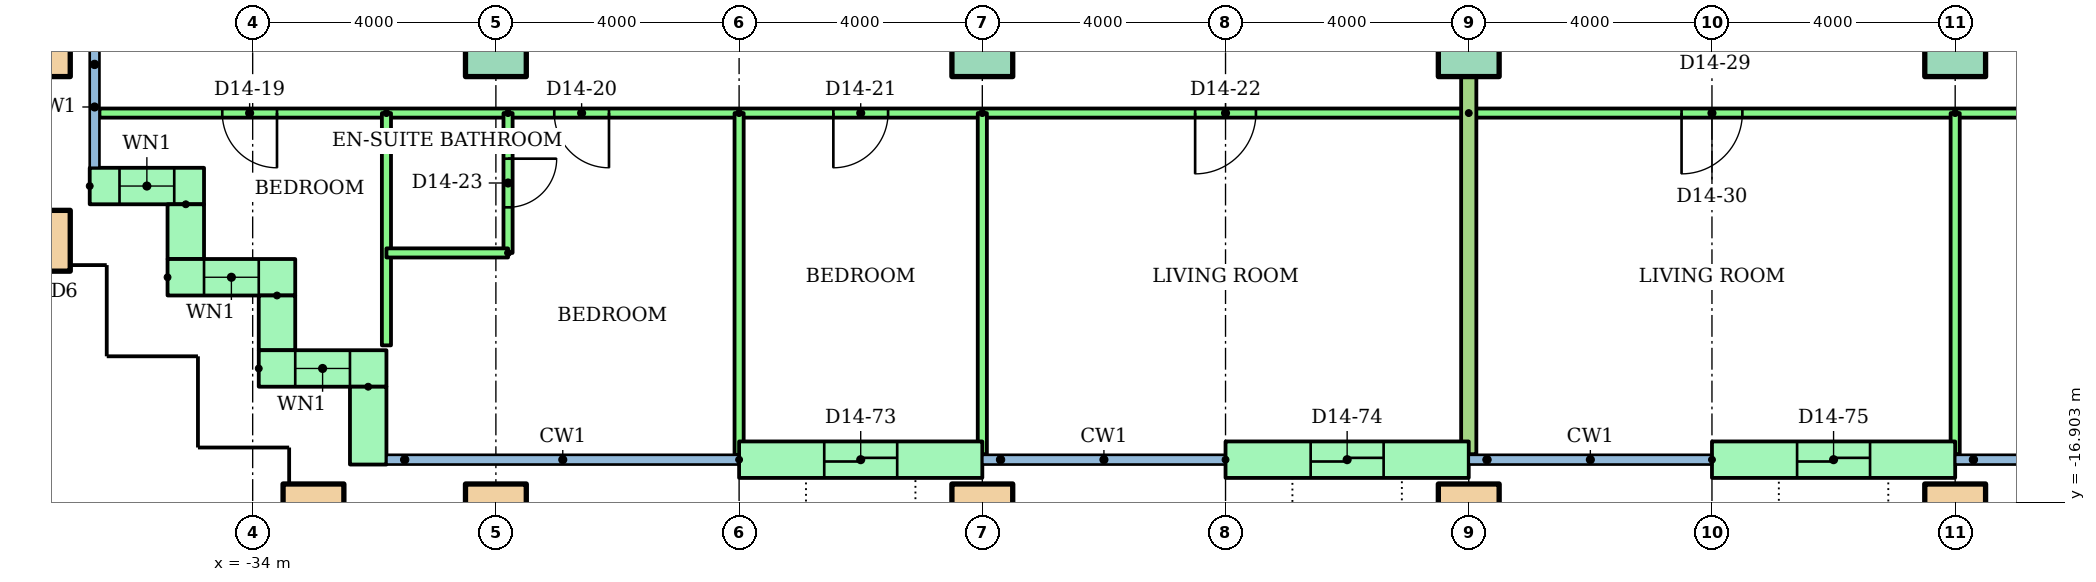
"""IFC4 building model, lengths in metres.
Left out: names, types, materials, properties, quantities, classifications, styles, units other than length and angle.
Written with IfcOpenShell. Run it as: python <this file> out.ifc"""

import sys

from ifc_helpers import new_model, si_unit, direction, frame, frame_2d, origin, origin_2d, place, context, subcontext, project, spatial, rectangle, hollow_rectangle, extrude, element, fill, save


model = new_model("IFC4")
c1 = context("Model", 3, precision=1e-05, world=origin(), true_north=direction((0.0, 1.0)))
c2 = subcontext(c1, "Body", "Model", "MODEL_VIEW")
j1 = project(units=[si_unit("LENGTHUNIT", "METRE"), si_unit("PLANEANGLEUNIT", "RADIAN")], contexts=[c1])
p1 = place(None, origin())
s1 = spatial("IfcSite", under=j1, at=p1, CompositionType="ELEMENT")
p2 = place(p1, origin())
s2 = spatial("IfcBuilding", under=s1, at=p2, CompositionType="ELEMENT")
p3 = place(p2, frame((0.0, 0.0, 54.4)))
s3 = spatial("IfcBuildingStorey", under=s2, at=p3, CompositionType="ELEMENT", Elevation=54.4)
for number, where in (
    (1, (-33.0, -17.1, 0.0)),
    (2, (-30.0, -17.1, 0.0)),
    (3, (-22.0, -17.1, 0.0)),
    (4, (-14.0, -17.1, 0.0)),
    (5, (-6.0, -17.1, 0.0)),
    (6, (-37.5, -12.6, 0.0)),
    (7, (-37.5, -9.4, 0.0)),
):
    element("IfcColumn", number, at=place(p3, frame(where)), inside=s3, PredefinedType="COLUMN", context=c2, shape_type="SweptSolid", body=[
        extrude(hollow_rectangle(XDim=1.0, YDim=1.0, WallThickness=0.05, at=origin_2d()), origin(), (0.0, 0.0, 1.0), 3.2),
    ])
for number, where in (
    (8, (-30.0, -9.4, 0.0)),
    (9, (-22.0, -9.4, 0.0)),
    (10, (-14.0, -9.4, 0.0)),
    (11, (-6.0, -9.4, 0.0)),
):
    element("IfcColumn", number, at=place(p3, frame(where)), inside=s3, PredefinedType="COLUMN", context=c2, shape_type="SweptSolid", body=[
        extrude(rectangle(XDim=1.0, YDim=1.0, at=origin_2d()), origin(), (0.0, 0.0, 1.0), 3.2),
    ])
p4 = place(p3, frame((-36.68, -11.7, 0.0)))
e12 = element("IfcWall", 12, at=p4, inside=s3, PredefinedType="STANDARD", context=c2, shape_type="SweptSolid", body=[
    extrude(rectangle(XDim=1.88, YDim=0.6, at=frame_2d((0.94, 0.0))), origin(), (0.0, 0.0, 1.0), 2.92),
])
p5 = place(p4, frame((0.49, 0.0, 0.9)))
e13 = element("IfcOpeningElement", 13, at=p5, cuts=e12, PredefinedType="OPENING", context=c2, shape_type="SweptSolid", body=[
    extrude(rectangle(XDim=0.9, YDim=1.5, at=frame_2d((0.45, 0.75))), frame((0.0, 0.31, 0.0), z_axis=(0.0, -1.0, 0.0), x_axis=(1.0, 0.0, 0.0)), (0.0, 0.0, 1.0), 0.62),
])
p6 = place(p3, frame((-35.1, -12.0, 0.0), z_axis=(0.0, 0.0, 1.0), x_axis=(0.0, -1.0, 0.0)))
e14 = element("IfcWall", 14, at=p6, inside=s3, PredefinedType="STANDARD", context=c2, shape_type="SweptSolid", body=[
    extrude(rectangle(XDim=0.9, YDim=0.6, at=frame_2d((0.45, 0.0))), origin(), (0.0, 0.0, 1.0), 2.92),
])
p7 = place(p3, frame((-35.4, -13.2, 0.0)))
e15 = element("IfcWall", 15, at=p7, inside=s3, PredefinedType="STANDARD", context=c2, shape_type="SweptSolid", body=[
    extrude(rectangle(XDim=2.1, YDim=0.6, at=frame_2d((1.05, 0.0))), origin(), (0.0, 0.0, 1.0), 2.92),
])
p8 = place(p7, frame((0.6, 0.0, 0.9)))
e16 = element("IfcOpeningElement", 16, at=p8, cuts=e15, PredefinedType="OPENING", context=c2, shape_type="SweptSolid", body=[
    extrude(rectangle(XDim=0.9, YDim=1.5, at=frame_2d((0.45, 0.75))), frame((0.0, 0.31, 0.0), z_axis=(0.0, -1.0, 0.0), x_axis=(1.0, 0.0, 0.0)), (0.0, 0.0, 1.0), 0.62),
])
p9 = place(p3, frame((-33.6, -13.5, 0.0), z_axis=(0.0, 0.0, 1.0), x_axis=(0.0, -1.0, 0.0)))
e17 = element("IfcWall", 17, at=p9, inside=s3, PredefinedType="STANDARD", context=c2, shape_type="SweptSolid", body=[
    extrude(rectangle(XDim=0.9, YDim=0.6, at=frame_2d((0.45, 0.0))), origin(), (0.0, 0.0, 1.0), 2.92),
])
p10 = place(p3, frame((-33.9, -14.7, 0.0)))
e18 = element("IfcWall", 18, at=p10, inside=s3, PredefinedType="STANDARD", context=c2, shape_type="SweptSolid", body=[
    extrude(rectangle(XDim=2.1, YDim=0.6, at=frame_2d((1.05, 0.0))), origin(), (0.0, 0.0, 1.0), 2.92),
])
p11 = place(p10, frame((0.6, 0.0, 0.9)))
e19 = element("IfcOpeningElement", 19, at=p11, cuts=e18, PredefinedType="OPENING", context=c2, shape_type="SweptSolid", body=[
    extrude(rectangle(XDim=0.9, YDim=1.5, at=frame_2d((0.45, 0.75))), frame((0.0, 0.31, 0.0), z_axis=(0.0, -1.0, 0.0), x_axis=(1.0, 0.0, 0.0)), (0.0, 0.0, 1.0), 0.62),
])
p12 = place(p3, frame((-32.1, -15.0, 0.0), z_axis=(0.0, 0.0, 1.0), x_axis=(0.0, -1.0, 0.0)))
e20 = element("IfcWall", 20, at=p12, inside=s3, PredefinedType="STANDARD", context=c2, shape_type="SweptSolid", body=[
    extrude(rectangle(XDim=1.28, YDim=0.6, at=frame_2d((0.64, 0.0))), origin(), (0.0, 0.0, 1.0), 2.92),
])
p13 = place(p3, frame((-26.0, -16.2, 0.0)))
e21 = element("IfcWall", 21, at=p13, inside=s3, PredefinedType="STANDARD", context=c2, shape_type="SweptSolid", body=[
    extrude(rectangle(XDim=4.0, YDim=0.6, at=frame_2d((2.0, 0.0))), origin(), (0.0, 0.0, 1.0), 2.92),
])
p14 = place(p13, frame((1.4, 0.0, 0.0)))
e22 = element("IfcOpeningElement", 22, at=p14, cuts=e21, PredefinedType="OPENING", context=c2, shape_type="SweptSolid", body=[
    extrude(rectangle(XDim=1.2, YDim=2.1, at=frame_2d((0.6, 1.05))), frame((0.0, 0.31, 0.0), z_axis=(0.0, -1.0, 0.0), x_axis=(1.0, 0.0, 0.0)), (0.0, 0.0, 1.0), 0.62),
])
p15 = place(p3, frame((-18.0, -16.2, 0.0)))
e23 = element("IfcWall", 23, at=p15, inside=s3, PredefinedType="STANDARD", context=c2, shape_type="SweptSolid", body=[
    extrude(rectangle(XDim=4.0, YDim=0.6, at=frame_2d((2.0, 0.0))), origin(), (0.0, 0.0, 1.0), 2.92),
])
p16 = place(p15, frame((1.4, 0.0, 0.0)))
e24 = element("IfcOpeningElement", 24, at=p16, cuts=e23, PredefinedType="OPENING", context=c2, shape_type="SweptSolid", body=[
    extrude(rectangle(XDim=1.2, YDim=2.1, at=frame_2d((0.6, 1.05))), frame((0.0, 0.31, 0.0), z_axis=(0.0, -1.0, 0.0), x_axis=(1.0, 0.0, 0.0)), (0.0, 0.0, 1.0), 0.62),
])
p17 = place(p3, frame((-10.0, -16.2, 0.0)))
e25 = element("IfcWall", 25, at=p17, inside=s3, PredefinedType="STANDARD", context=c2, shape_type="SweptSolid", body=[
    extrude(rectangle(XDim=4.0, YDim=0.6, at=frame_2d((2.0, 0.0))), origin(), (0.0, 0.0, 1.0), 2.92),
])
p18 = place(p17, frame((1.4, 0.0, 0.0)))
e26 = element("IfcOpeningElement", 26, at=p18, cuts=e25, PredefinedType="OPENING", context=c2, shape_type="SweptSolid", body=[
    extrude(rectangle(XDim=1.2, YDim=2.1, at=frame_2d((0.6, 1.05))), frame((0.0, 0.31, 0.0), z_axis=(0.0, -1.0, 0.0), x_axis=(1.0, 0.0, 0.0)), (0.0, 0.0, 1.0), 0.62),
])
p19 = place(p3, frame((-14.0, -10.5, 0.0), z_axis=(0.0, 0.0, 1.0), x_axis=(-1.0, 0.0, 0.0)))
e27 = element("IfcWall", 27, at=p19, inside=s3, PredefinedType="PARTITIONING", context=c2, shape_type="SweptSolid", body=[
    extrude(rectangle(XDim=22.52, YDim=0.15, at=frame_2d((11.26, 0.0))), origin(), (0.0, 0.0, 1.0), 2.4),
])
p20 = place(p19, frame((19.6, 0.0, 0.0)))
e28 = element("IfcOpeningElement", 28, at=p20, cuts=e27, PredefinedType="OPENING", context=c2, shape_type="SweptSolid", body=[
    extrude(rectangle(XDim=0.9, YDim=2.1, at=frame_2d((0.45, 1.05))), frame((0.0, 0.085, 0.0), z_axis=(0.0, -1.0, 0.0), x_axis=(1.0, 0.0, 0.0)), (0.0, 0.0, 1.0), 0.17),
])
p21 = place(p19, frame((14.14, 0.0, 0.0)))
e29 = element("IfcOpeningElement", 29, at=p21, cuts=e27, PredefinedType="OPENING", context=c2, shape_type="SweptSolid", body=[
    extrude(rectangle(XDim=0.9, YDim=2.1, at=frame_2d((0.45, 1.05))), frame((0.0, 0.085, 0.0), z_axis=(0.0, -1.0, 0.0), x_axis=(1.0, 0.0, 0.0)), (0.0, 0.0, 1.0), 0.17),
])
p22 = place(p19, frame((9.55, 0.0, 0.0)))
e30 = element("IfcOpeningElement", 30, at=p22, cuts=e27, PredefinedType="OPENING", context=c2, shape_type="SweptSolid", body=[
    extrude(rectangle(XDim=0.9, YDim=2.1, at=frame_2d((0.45, 1.05))), frame((0.0, 0.085, 0.0), z_axis=(0.0, -1.0, 0.0), x_axis=(1.0, 0.0, 0.0)), (0.0, 0.0, 1.0), 0.17),
])
p23 = place(p19, frame((3.5, 0.0, 0.0)))
e31 = element("IfcOpeningElement", 31, at=p23, cuts=e27, PredefinedType="OPENING", context=c2, shape_type="SweptSolid", body=[
    extrude(rectangle(XDim=1.0, YDim=2.1, at=frame_2d((0.5, 1.05))), frame((0.0, 0.085, 0.0), z_axis=(0.0, -1.0, 0.0), x_axis=(1.0, 0.0, 0.0)), (0.0, 0.0, 1.0), 0.17),
])
p24 = place(p3, frame((-31.8, -10.5, 0.0), z_axis=(0.0, 0.0, 1.0), x_axis=(0.0, -1.0, 0.0)))
e32 = element("IfcWall", 32, at=p24, inside=s3, PredefinedType="PARTITIONING", context=c2, shape_type="SweptSolid", body=[
    extrude(rectangle(XDim=3.82, YDim=0.15, at=frame_2d((1.91, 0.0))), origin(), (0.0, 0.0, 1.0), 2.4),
])
p25 = place(p3, frame((-26.0, -10.5, 0.0), z_axis=(0.0, 0.0, 1.0), x_axis=(0.0, -1.0, 0.0)))
e33 = element("IfcWall", 33, at=p25, inside=s3, PredefinedType="PARTITIONING", context=c2, shape_type="SweptSolid", body=[
    extrude(rectangle(XDim=5.621, YDim=0.15, at=frame_2d((2.811, 0.0))), origin(), (0.0, 0.0, 1.0), 2.4),
])
p26 = place(p3, frame((-22.0, -10.5, 0.0), z_axis=(0.0, 0.0, 1.0), x_axis=(0.0, -1.0, 0.0)))
e34 = element("IfcWall", 34, at=p26, inside=s3, PredefinedType="PARTITIONING", context=c2, shape_type="SweptSolid", body=[
    extrude(rectangle(XDim=5.61, YDim=0.15, at=frame_2d((2.805, 0.0))), origin(), (0.0, 0.0, 1.0), 2.4),
])
p27 = place(p3, frame((-29.8, -10.5, 0.0), z_axis=(0.0, 0.0, 1.0), x_axis=(0.0, -1.0, 0.0)))
e35 = element("IfcWall", 35, at=p27, inside=s3, PredefinedType="PARTITIONING", context=c2, shape_type="SweptSolid", body=[
    extrude(rectangle(XDim=2.3, YDim=0.15, at=frame_2d((1.15, 0.0))), origin(), (0.0, 0.0, 1.0), 2.4),
])
p28 = place(p27, frame((0.75, 0.0, 0.0)))
e36 = element("IfcOpeningElement", 36, at=p28, cuts=e35, PredefinedType="OPENING", context=c2, shape_type="SweptSolid", body=[
    extrude(rectangle(XDim=0.8, YDim=2.1, at=frame_2d((0.4, 1.05))), frame((0.0, 0.085, 0.0), z_axis=(0.0, -1.0, 0.0), x_axis=(1.0, 0.0, 0.0)), (0.0, 0.0, 1.0), 0.17),
])
p29 = place(p3, frame((-29.8, -12.8, 0.0), z_axis=(0.0, 0.0, 1.0), x_axis=(-1.0, 0.0, 0.0)))
e37 = element("IfcWall", 37, at=p29, inside=s3, PredefinedType="PARTITIONING", context=c2, shape_type="SweptSolid", body=[
    extrude(rectangle(XDim=2.0, YDim=0.15, at=frame_2d((1.0, 0.0))), origin(), (0.0, 0.0, 1.0), 2.4),
])
p30 = place(p3, frame((10.0, -10.5, 0.0), z_axis=(0.0, 0.0, 1.0), x_axis=(-1.0, 0.0, 0.0)))
e38 = element("IfcWall", 38, at=p30, inside=s3, PredefinedType="PARTITIONING", context=c2, shape_type="SweptSolid", body=[
    extrude(rectangle(XDim=24.0, YDim=0.15, at=frame_2d((12.0, 0.0))), origin(), (0.0, 0.0, 1.0), 2.4),
])
p31 = place(p30, frame((19.5, 0.0, 0.0)))
e39 = element("IfcOpeningElement", 39, at=p31, cuts=e38, PredefinedType="OPENING", context=c2, shape_type="SweptSolid", body=[
    extrude(rectangle(XDim=1.0, YDim=2.1, at=frame_2d((0.5, 1.05))), frame((0.0, 0.085, 0.0), z_axis=(0.0, -1.0, 0.0), x_axis=(1.0, 0.0, 0.0)), (0.0, 0.0, 1.0), 0.17),
])
p32 = place(p30, frame((13.55, 0.0, 0.0)))
e40 = element("IfcOpeningElement", 40, at=p32, cuts=e38, PredefinedType="OPENING", context=c2, shape_type="SweptSolid", body=[
    extrude(rectangle(XDim=0.9, YDim=2.1, at=frame_2d((0.45, 1.05))), frame((0.0, 0.085, 0.0), z_axis=(0.0, -1.0, 0.0), x_axis=(1.0, 0.0, 0.0)), (0.0, 0.0, 1.0), 0.17),
])
p33 = place(p30, frame((9.55, 0.0, 0.0)))
e41 = element("IfcOpeningElement", 41, at=p33, cuts=e38, PredefinedType="OPENING", context=c2, shape_type="SweptSolid", body=[
    extrude(rectangle(XDim=0.9, YDim=2.1, at=frame_2d((0.45, 1.05))), frame((0.0, 0.085, 0.0), z_axis=(0.0, -1.0, 0.0), x_axis=(1.0, 0.0, 0.0)), (0.0, 0.0, 1.0), 0.17),
])
p34 = place(p30, frame((5.55, 0.0, 0.0)))
e42 = element("IfcOpeningElement", 42, at=p34, cuts=e38, PredefinedType="OPENING", context=c2, shape_type="SweptSolid", body=[
    extrude(rectangle(XDim=0.9, YDim=2.1, at=frame_2d((0.45, 1.05))), frame((0.0, 0.085, 0.0), z_axis=(0.0, -1.0, 0.0), x_axis=(1.0, 0.0, 0.0)), (0.0, 0.0, 1.0), 0.17),
])
p35 = place(p30, frame((1.55, 0.0, 0.0)))
e43 = element("IfcOpeningElement", 43, at=p35, cuts=e38, PredefinedType="OPENING", context=c2, shape_type="SweptSolid", body=[
    extrude(rectangle(XDim=0.9, YDim=2.1, at=frame_2d((0.45, 1.05))), frame((0.0, 0.085, 0.0), z_axis=(0.0, -1.0, 0.0), x_axis=(1.0, 0.0, 0.0)), (0.0, 0.0, 1.0), 0.17),
])
p36 = place(p3, frame((-6.0, -10.5, 0.0), z_axis=(0.0, 0.0, 1.0), x_axis=(0.0, -1.0, 0.0)))
e44 = element("IfcWall", 44, at=p36, inside=s3, PredefinedType="PARTITIONING", context=c2, shape_type="SweptSolid", body=[
    extrude(rectangle(XDim=5.61, YDim=0.15, at=frame_2d((2.805, 0.0))), origin(), (0.0, 0.0, 1.0), 2.4),
])
p37 = place(p3, frame((-14.0, -1.4, 0.0), z_axis=(0.0, 0.0, 1.0), x_axis=(0.0, -1.0, 0.0)))
e45 = element("IfcWall", 45, at=p37, inside=s3, PredefinedType="PARTITIONING", context=c2, shape_type="SweptSolid", body=[
    extrude(rectangle(XDim=14.71, YDim=0.25, at=frame_2d((7.355, 0.0))), origin(), (0.0, 0.0, 1.0), 2.4),
])
p38 = place(p5, origin())
e46 = element("IfcWindow", 46, at=p38, inside=s3, PartitioningType="SINGLE_PANEL", PredefinedType="WINDOW", context=c2, shape_type="SweptSolid", body=[
    extrude(rectangle(XDim=0.9, YDim=1.5, at=frame_2d((0.45, 0.75))), frame((0.0, 0.03, 0.0), z_axis=(0.0, -1.0, 0.0), x_axis=(1.0, 0.0, 0.0)), (0.0, 0.0, 1.0), 0.06),
])
fill(e13, e46)
p39 = place(p8, origin())
e47 = element("IfcWindow", 47, at=p39, inside=s3, PartitioningType="SINGLE_PANEL", PredefinedType="WINDOW", context=c2, shape_type="SweptSolid", body=[
    extrude(rectangle(XDim=0.9, YDim=1.5, at=frame_2d((0.45, 0.75))), frame((0.0, 0.03, 0.0), z_axis=(0.0, -1.0, 0.0), x_axis=(1.0, 0.0, 0.0)), (0.0, 0.0, 1.0), 0.06),
])
fill(e16, e47)
p40 = place(p11, origin())
e48 = element("IfcWindow", 48, at=p40, inside=s3, PartitioningType="SINGLE_PANEL", PredefinedType="WINDOW", context=c2, shape_type="SweptSolid", body=[
    extrude(rectangle(XDim=0.9, YDim=1.5, at=frame_2d((0.45, 0.75))), frame((0.0, 0.03, 0.0), z_axis=(0.0, -1.0, 0.0), x_axis=(1.0, 0.0, 0.0)), (0.0, 0.0, 1.0), 0.06),
])
fill(e19, e48)
p41 = place(p20, origin())
e49 = element("IfcDoor", 49, at=p41, inside=s3, OperationType="SINGLE_SWING_LEFT", PredefinedType="DOOR", context=c2, shape_type="SweptSolid", body=[
    extrude(rectangle(XDim=0.9, YDim=2.1, at=frame_2d((0.45, 1.05))), frame((0.0, 0.025, 0.0), z_axis=(0.0, -1.0, 0.0), x_axis=(1.0, 0.0, 0.0)), (0.0, 0.0, 1.0), 0.05),
])
fill(e28, e49)
p42 = place(p21, origin())
e50 = element("IfcDoor", 50, at=p42, inside=s3, OperationType="SINGLE_SWING_LEFT", PredefinedType="DOOR", context=c2, shape_type="SweptSolid", body=[
    extrude(rectangle(XDim=0.9, YDim=2.1, at=frame_2d((0.45, 1.05))), frame((0.0, 0.025, 0.0), z_axis=(0.0, -1.0, 0.0), x_axis=(1.0, 0.0, 0.0)), (0.0, 0.0, 1.0), 0.05),
])
fill(e29, e50)
p43 = place(p22, origin())
e51 = element("IfcDoor", 51, at=p43, inside=s3, OperationType="SINGLE_SWING_RIGHT", PredefinedType="DOOR", context=c2, shape_type="SweptSolid", body=[
    extrude(rectangle(XDim=0.9, YDim=2.1, at=frame_2d((0.45, 1.05))), frame((0.0, 0.025, 0.0), z_axis=(0.0, -1.0, 0.0), x_axis=(1.0, 0.0, 0.0)), (0.0, 0.0, 1.0), 0.05),
])
fill(e30, e51)
p44 = place(p23, origin())
e52 = element("IfcDoor", 52, at=p44, inside=s3, OperationType="SINGLE_SWING_RIGHT", PredefinedType="DOOR", context=c2, shape_type="SweptSolid", body=[
    extrude(rectangle(XDim=1.0, YDim=2.1, at=frame_2d((0.5, 1.05))), frame((0.0, 0.025, 0.0), z_axis=(0.0, -1.0, 0.0), x_axis=(1.0, 0.0, 0.0)), (0.0, 0.0, 1.0), 0.05),
])
fill(e31, e52)
p45 = place(p28, origin())
e53 = element("IfcDoor", 53, at=p45, inside=s3, OperationType="SINGLE_SWING_LEFT", PredefinedType="DOOR", context=c2, shape_type="SweptSolid", body=[
    extrude(rectangle(XDim=0.8, YDim=2.1, at=frame_2d((0.4, 1.05))), frame((0.0, 0.025, 0.0), z_axis=(0.0, -1.0, 0.0), x_axis=(1.0, 0.0, 0.0)), (0.0, 0.0, 1.0), 0.05),
])
fill(e36, e53)
p46 = place(p31, origin())
e54 = element("IfcDoor", 54, at=p46, inside=s3, OperationType="SINGLE_SWING_RIGHT", PredefinedType="DOOR", context=c2, shape_type="SweptSolid", body=[
    extrude(rectangle(XDim=1.0, YDim=2.1, at=frame_2d((0.5, 1.05))), frame((0.0, 0.025, 0.0), z_axis=(0.0, -1.0, 0.0), x_axis=(1.0, 0.0, 0.0)), (0.0, 0.0, 1.0), 0.05),
])
fill(e39, e54)
p47 = place(p14, origin())
e55 = element("IfcDoor", 55, at=p47, inside=s3, OperationType="SLIDING_TO_LEFT", PredefinedType="DOOR", context=c2, shape_type="SweptSolid", body=[
    extrude(rectangle(XDim=1.2, YDim=2.1, at=frame_2d((0.6, 1.05))), frame((0.0, 0.025, 0.0), z_axis=(0.0, -1.0, 0.0), x_axis=(1.0, 0.0, 0.0)), (0.0, 0.0, 1.0), 0.05),
])
fill(e22, e55)
p48 = place(p16, origin())
e56 = element("IfcDoor", 56, at=p48, inside=s3, OperationType="SLIDING_TO_LEFT", PredefinedType="DOOR", context=c2, shape_type="SweptSolid", body=[
    extrude(rectangle(XDim=1.2, YDim=2.1, at=frame_2d((0.6, 1.05))), frame((0.0, 0.025, 0.0), z_axis=(0.0, -1.0, 0.0), x_axis=(1.0, 0.0, 0.0)), (0.0, 0.0, 1.0), 0.05),
])
fill(e24, e56)
p49 = place(p18, origin())
e57 = element("IfcDoor", 57, at=p49, inside=s3, OperationType="SLIDING_TO_LEFT", PredefinedType="DOOR", context=c2, shape_type="SweptSolid", body=[
    extrude(rectangle(XDim=1.2, YDim=2.1, at=frame_2d((0.6, 1.05))), frame((0.0, 0.025, 0.0), z_axis=(0.0, -1.0, 0.0), x_axis=(1.0, 0.0, 0.0)), (0.0, 0.0, 1.0), 0.05),
])
fill(e26, e57)
save(model, sys.argv[1])
